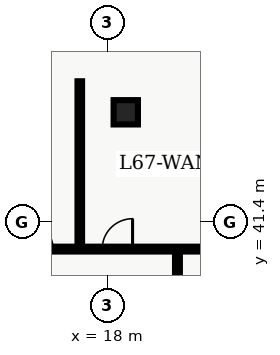
"""IFC4 building model, lengths in metres.
Left out: names, types, materials, properties, quantities, classifications, styles, units other than length and angle.
Written with IfcOpenShell. Run it as: python <this file> out.ifc"""

import sys

from ifc_helpers import new_model, entity, si_unit, converted_unit, direction, frame, origin_with_axes, origin_2d_with_axis, place, context, subcontext, project, spatial, polyline, rectangle, outline, extrude, element, fill, save


model = new_model("IFC4")
c1 = context("Model", 3, precision=1e-05, world=origin_with_axes(), true_north=direction((0.0, 1.0)))
c2 = subcontext(c1, "Body", "Model", "MODEL_VIEW")
j1 = project(units=[si_unit("LENGTHUNIT", "METRE"), converted_unit("PLANEANGLEUNIT", "DEGREE", entity("IfcPlaneAngleMeasure", 0.017), si_unit("PLANEANGLEUNIT", "RADIAN"), dimensions=[0, 0, 0, 0, 0, 0, 0])], contexts=[c1])
p1 = place(None, origin_with_axes())
s1 = spatial("IfcSite", under=j1, at=p1, CompositionType="ELEMENT")
p2 = place(p1, origin_with_axes())
s2 = spatial("IfcBuilding", under=s1, at=p2, CompositionType="ELEMENT")
p3 = place(p2, frame((0.0, 0.0, 272.4), z_axis=(0.0, 0.0, 1.0), x_axis=(1.0, 0.0, 0.0)))
s3 = spatial("IfcBuildingStorey", under=s2, at=p3, CompositionType="ELEMENT", Elevation=272.4)
p4 = place(p3, frame((18.6, 45.0, 0.0), z_axis=(0.0, 0.0, 1.0), x_axis=(1.0, 0.0, 0.0)))
e1 = element("IfcColumn", 1, at=p4, inside=s3, PredefinedType="COLUMN", context=c2, shape_type="SweptSolid", body=[
    extrude(rectangle(XDim=0.8, YDim=0.8, at=origin_2d_with_axis()), origin_with_axes(), (0.0, 0.0, 1.0), 3.9),
])
p5 = place(p3, frame((8.135, 40.5, 0.0), z_axis=(0.0, 0.0, 1.0), x_axis=(1.0, 0.0, 0.0)))
e2 = element("IfcWall", 2, at=p5, inside=s3, PredefinedType="PARTITIONING", context=c2, shape_type="SweptSolid", body=[
    extrude(outline(polyline([(0.0, -0.08), (23.93, -0.08), (23.93, 0.08), (0.0, 0.08), (0.0, -0.08)])), origin_with_axes(), (0.0, 0.0, 1.0), 2.7),
])
p6 = place(p5, frame((0.76, 0.0, 0.0), z_axis=(0.0, 0.0, 1.0), x_axis=(1.0, 0.0, 0.0)))
e3 = element("IfcOpeningElement", 3, at=p6, cuts=e2, PredefinedType="OPENING", context=c2, shape_type="SweptSolid", body=[
    extrude(rectangle(XDim=1.0, YDim=0.18, at=origin_2d_with_axis()), origin_with_axes(), (0.0, 0.0, 1.0), 2.15),
])
p7 = place(p5, frame((4.729, 0.0, 0.0), z_axis=(0.0, 0.0, 1.0), x_axis=(1.0, 0.0, 0.0)))
e4 = element("IfcOpeningElement", 4, at=p7, cuts=e2, PredefinedType="OPENING", context=c2, shape_type="SweptSolid", body=[
    extrude(rectangle(XDim=1.0, YDim=0.18, at=origin_2d_with_axis()), origin_with_axes(), (0.0, 0.0, 1.0), 2.15),
])
p8 = place(p5, frame((7.574, 0.0, 0.0), z_axis=(0.0, 0.0, 1.0), x_axis=(1.0, 0.0, 0.0)))
e5 = element("IfcOpeningElement", 5, at=p8, cuts=e2, PredefinedType="OPENING", context=c2, shape_type="SweptSolid", body=[
    extrude(rectangle(XDim=1.0, YDim=0.18, at=origin_2d_with_axis()), origin_with_axes(), (0.0, 0.0, 1.0), 2.15),
])
p9 = place(p5, frame((10.189, 0.0, 0.0), z_axis=(0.0, 0.0, 1.0), x_axis=(1.0, 0.0, 0.0)))
e6 = element("IfcOpeningElement", 6, at=p9, cuts=e2, PredefinedType="OPENING", context=c2, shape_type="SweptSolid", body=[
    extrude(rectangle(XDim=1.0, YDim=0.18, at=origin_2d_with_axis()), origin_with_axes(), (0.0, 0.0, 1.0), 2.15),
])
p10 = place(p3, frame((20.3, 7.8, 0.0), z_axis=(0.0, 0.0, 1.0), x_axis=(0.0, 1.0, 0.0)))
e7 = element("IfcWall", 7, at=p10, inside=s3, PredefinedType="PARTITIONING", context=c2, shape_type="SweptSolid", body=[
    extrude(outline(polyline([(0.0, -0.08), (32.7, -0.08), (32.7, 0.08), (0.0, 0.08), (0.0, -0.08)])), origin_with_axes(), (0.0, 0.0, 1.0), 2.7),
])
p11 = place(p10, frame((14.2, 0.0, 0.0), z_axis=(0.0, 0.0, 1.0), x_axis=(1.0, 0.0, 0.0)))
e8 = element("IfcOpeningElement", 8, at=p11, cuts=e7, PredefinedType="OPENING", context=c2, shape_type="SweptSolid", body=[
    extrude(rectangle(XDim=1.0, YDim=0.18, at=origin_2d_with_axis()), origin_with_axes(), (0.0, 0.0, 1.0), 2.15),
])
p12 = place(p10, frame((18.779, 0.0, 0.0), z_axis=(0.0, 0.0, 1.0), x_axis=(1.0, 0.0, 0.0)))
e9 = element("IfcOpeningElement", 9, at=p12, cuts=e7, PredefinedType="OPENING", context=c2, shape_type="SweptSolid", body=[
    extrude(rectangle(XDim=1.0, YDim=0.18, at=origin_2d_with_axis()), origin_with_axes(), (0.0, 0.0, 1.0), 2.15),
])
p13 = place(p10, frame((23.784, 0.0, 0.0), z_axis=(0.0, 0.0, 1.0), x_axis=(1.0, 0.0, 0.0)))
e10 = element("IfcOpeningElement", 10, at=p13, cuts=e7, PredefinedType="OPENING", context=c2, shape_type="SweptSolid", body=[
    extrude(rectangle(XDim=1.0, YDim=0.18, at=origin_2d_with_axis()), origin_with_axes(), (0.0, 0.0, 1.0), 2.15),
])
p14 = place(p10, frame((27.651, 0.0, 0.0), z_axis=(0.0, 0.0, 1.0), x_axis=(1.0, 0.0, 0.0)))
e11 = element("IfcOpeningElement", 11, at=p14, cuts=e7, PredefinedType="OPENING", context=c2, shape_type="SweptSolid", body=[
    extrude(rectangle(XDim=1.0, YDim=0.18, at=origin_2d_with_axis()), origin_with_axes(), (0.0, 0.0, 1.0), 2.15),
])
p15 = place(p10, frame((5.475, 0.0, 0.0), z_axis=(0.0, 0.0, 1.0), x_axis=(1.0, 0.0, 0.0)))
e12 = element("IfcOpeningElement", 12, at=p15, cuts=e7, PredefinedType="OPENING", context=c2, shape_type="SweptSolid", body=[
    extrude(rectangle(XDim=1.05, YDim=0.18, at=origin_2d_with_axis()), origin_with_axes(), (0.0, 0.0, 1.0), 2.15),
])
p16 = place(p3, frame((17.088, 40.6, 0.0), z_axis=(0.0, 0.0, 1.0), x_axis=(0.0, 1.0, 0.0)))
e13 = element("IfcWall", 13, at=p16, inside=s3, PredefinedType="PARTITIONING", context=c2, shape_type="SweptSolid", body=[
    extrude(outline(polyline([(0.0, -0.075), (5.42, -0.075), (5.42, 0.075), (0.0, 0.075), (0.0, -0.075)])), origin_with_axes(), (0.0, 0.0, 1.0), 2.7),
])
p17 = place(p5, frame((7.574, 0.0, 0.0), z_axis=(0.0, 0.0, 1.0), x_axis=(1.0, 0.0, 0.0)))
e14 = element("IfcDoor", 14, at=p17, inside=s3, OperationType="SINGLE_SWING_LEFT", PredefinedType="DOOR", context=c2, shape_type="SweptSolid", body=[
    extrude(rectangle(XDim=1.0, YDim=0.09, at=origin_2d_with_axis()), origin_with_axes(), (0.0, 0.0, 1.0), 2.15),
])
fill(e5, e14)
p18 = place(p5, frame((10.189, 0.0, 0.0), z_axis=(0.0, 0.0, 1.0), x_axis=(1.0, 0.0, 0.0)))
e15 = element("IfcDoor", 15, at=p18, inside=s3, OperationType="SINGLE_SWING_RIGHT", PredefinedType="DOOR", context=c2, shape_type="SweptSolid", body=[
    extrude(rectangle(XDim=1.0, YDim=0.09, at=origin_2d_with_axis()), origin_with_axes(), (0.0, 0.0, 1.0), 2.15),
])
fill(e6, e15)
save(model, sys.argv[1])
